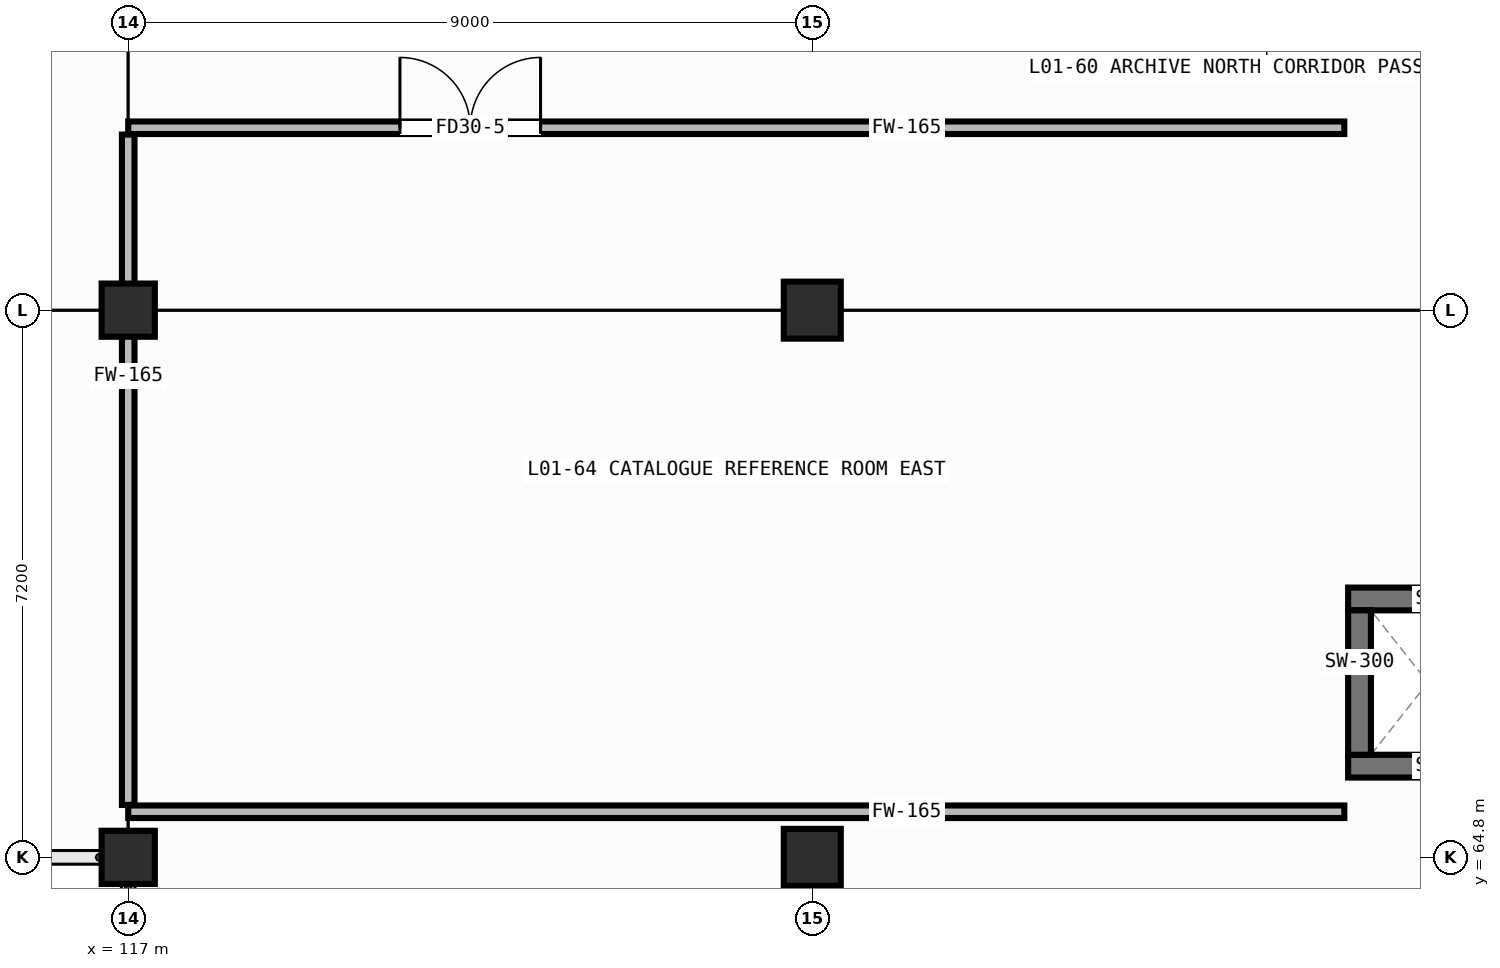
"""IFC4 building model, lengths in metres.
Left out: names, types, materials, properties, quantities, classifications, styles, units other than length and angle.
Written with IfcOpenShell. Run it as: python <this file> out.ifc"""

import sys

from ifc_helpers import new_model, si_unit, direction, frame, frame_2d, origin, origin_2d, place, context, subcontext, project, spatial, rectangle, hollow_rectangle, extrude, element, fill, save


model = new_model("IFC4")
c1 = context("Model", 3, precision=1e-05, world=origin(), true_north=direction((0.0, 1.0)))
c2 = subcontext(c1, "Body", "Model", "MODEL_VIEW")
j1 = project(units=[si_unit("LENGTHUNIT", "METRE"), si_unit("PLANEANGLEUNIT", "RADIAN")], contexts=[c1])
p1 = place(None, origin())
s1 = spatial("IfcSite", under=j1, at=p1, CompositionType="ELEMENT")
p2 = place(p1, origin())
s2 = spatial("IfcBuilding", under=s1, at=p2, CompositionType="ELEMENT")
p3 = place(p2, origin())
s3 = spatial("IfcBuildingStorey", under=s2, at=p3, CompositionType="ELEMENT", Elevation=0.0)
for number, where, z_axis, x_axis in (
    (1, (117.0, 64.8, 0.0), (0.0, 0.0, 1.0), (1.0, 0.0, 0.0)),
    (2, (117.0, 72.0, 0.0), (0.0, 0.0, 1.0), (1.0, 0.0, 0.0)),
):
    element("IfcColumn", number, at=place(p3, frame(where, z_axis=z_axis, x_axis=x_axis)), inside=s3, PredefinedType="COLUMN", context=c2, shape_type="SweptSolid", body=[
        extrude(hollow_rectangle(XDim=0.7, YDim=0.7, WallThickness=0.028, at=origin_2d()), origin(), (0.0, 0.0, 1.0), 4.8),
    ])
for number, where, z_axis, x_axis in (
    (3, (126.0, 64.8, 0.0), (0.0, 0.0, 1.0), (1.0, 0.0, 0.0)),
    (4, (126.0, 72.0, 0.0), (0.0, 0.0, 1.0), (1.0, 0.0, 0.0)),
):
    element("IfcColumn", number, at=place(p3, frame(where, z_axis=z_axis, x_axis=x_axis)), inside=s3, PredefinedType="COLUMN", context=c2, shape_type="SweptSolid", body=[
        extrude(hollow_rectangle(XDim=0.75, YDim=0.75, WallThickness=0.032, at=origin_2d()), origin(), (0.0, 0.0, 1.0), 4.8),
    ])
for number, where, z_axis, x_axis in (
    (5, (133.05, 66.0, 0.0), (0.0, 0.0, 1.0), (1.0, 0.0, 0.0)),
    (6, (133.05, 68.2, 0.0), (0.0, 0.0, 1.0), (1.0, 0.0, 0.0)),
):
    element("IfcWall", number, at=place(p3, frame(where, z_axis=z_axis, x_axis=x_axis)), inside=s3, PredefinedType="SHEAR", context=c2, shape_type="SweptSolid", body=[
        extrude(rectangle(XDim=2.1, YDim=0.3, at=frame_2d((1.05, 0.0))), origin(), (0.0, 0.0, 1.0), 4.555),
    ])
p4 = place(p3, frame((133.2, 66.15, 0.0), z_axis=(0.0, 0.0, 1.0), x_axis=(0.0, 1.0, 0.0)))
e7 = element("IfcWall", 7, at=p4, inside=s3, PredefinedType="SHEAR", context=c2, shape_type="SweptSolid", body=[
    extrude(rectangle(XDim=1.9, YDim=0.3, at=frame_2d((0.95, 0.0))), origin(), (0.0, 0.0, 1.0), 4.555),
])
p5 = place(p3, frame((117.0, 65.4, 0.0), z_axis=(0.0, 0.0, 1.0), x_axis=(1.0, 0.0, 0.0)))
e8 = element("IfcWall", 8, at=p5, inside=s3, PredefinedType="PARTITIONING", context=c2, shape_type="SweptSolid", body=[
    extrude(rectangle(XDim=16.0, YDim=0.165, at=frame_2d((8.0, 0.0))), origin(), (0.0, 0.0, 1.0), 4.555),
])
p6 = place(p3, frame((117.0, 74.4, 0.0), z_axis=(0.0, 0.0, 1.0), x_axis=(1.0, 0.0, 0.0)))
e9 = element("IfcWall", 9, at=p6, inside=s3, PredefinedType="PARTITIONING", context=c2, shape_type="SweptSolid", body=[
    extrude(rectangle(XDim=16.0, YDim=0.165, at=frame_2d((8.0, 0.0))), origin(), (0.0, 0.0, 1.0), 4.555),
])
p7 = place(p6, frame((3.575, 0.0, 0.0)))
e10 = element("IfcOpeningElement", 10, at=p7, cuts=e9, PredefinedType="OPENING", context=c2, shape_type="SweptSolid", body=[
    extrude(rectangle(XDim=1.85, YDim=2.12, at=frame_2d((0.925, 1.06))), frame((0.0, 0.094, 0.0), z_axis=(0.0, -1.0, 0.0), x_axis=(1.0, 0.0, 0.0)), (0.0, 0.0, 1.0), 0.189),
])
p8 = place(p3, frame((117.0, 65.49, 0.0), z_axis=(0.0, 0.0, 1.0), x_axis=(0.0, 1.0, 0.0)))
e11 = element("IfcWall", 11, at=p8, inside=s3, PredefinedType="PARTITIONING", context=c2, shape_type="SweptSolid", body=[
    extrude(rectangle(XDim=8.82, YDim=0.165, at=frame_2d((4.41, 0.0))), origin(), (0.0, 0.0, 1.0), 3.835),
])
p9 = place(p7, origin())
e12 = element("IfcDoor", 12, at=p9, inside=s3, OperationType="DOUBLE_DOOR_SINGLE_SWING", PredefinedType="DOOR", context=c2, shape_type="SweptSolid", body=[
    extrude(rectangle(XDim=1.85, YDim=2.12, at=frame_2d((0.925, 1.06))), frame((0.0, 0.025, 0.0), z_axis=(0.0, -1.0, 0.0), x_axis=(1.0, 0.0, 0.0)), (0.0, 0.0, 1.0), 0.05),
])
fill(e10, e12)
save(model, sys.argv[1])
